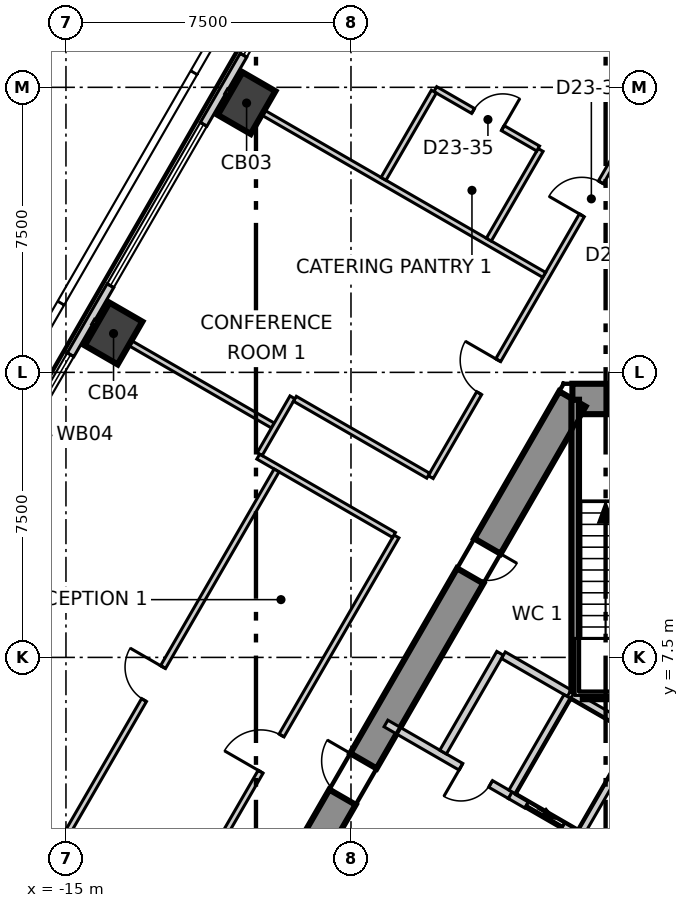
"""IFC4 building model, lengths in metres.
Left out: names, types, materials, properties, quantities, classifications, styles, units other than length and angle.
Written with IfcOpenShell. Run it as: python <this file> out.ifc"""

import sys

from ifc_helpers import new_model, si_unit, direction, frame, frame_2d, origin, origin_2d, place, context, subcontext, project, spatial, polyline, rectangle, outline, extrude, element, fill, save


model = new_model("IFC4")
c1 = context("Model", 3, precision=1e-05, world=origin(), true_north=direction((0.0, 1.0)))
c2 = subcontext(c1, "Body", "Model", "MODEL_VIEW")
j1 = project(units=[si_unit("LENGTHUNIT", "METRE"), si_unit("PLANEANGLEUNIT", "RADIAN")], contexts=[c1])
p1 = place(None, origin())
s1 = spatial("IfcSite", under=j1, at=p1, CompositionType="ELEMENT")
p2 = place(p1, origin())
s2 = spatial("IfcBuilding", under=s1, at=p2, CompositionType="ELEMENT")
p3 = place(p2, frame((0.0, 0.0, 104.3)))
s3 = spatial("IfcBuildingStorey", under=s2, at=p3, CompositionType="ELEMENT", Elevation=104.3)
p4 = place(p3, frame((1.674, 14.3, -0.3), z_axis=(0.0, 0.0, 1.0), x_axis=(-1.0, 0.0, 0.0)))
e1 = element("IfcWall", 1, at=p4, inside=s3, PredefinedType="SHEAR", context=c2, shape_type="SweptSolid", body=[
    extrude(outline(polyline([(-0.231, -0.4), (1.674, -0.4), (3.579, -0.4), (3.117, 0.4), (1.674, 0.4), (0.231, 0.4), (-0.231, -0.4)])), origin(), (0.0, 0.0, 1.0), 4.0),
])
p5 = place(p4, frame((0.974, 0.0, 0.3)))
e2 = element("IfcOpeningElement", 2, at=p5, cuts=e1, PredefinedType="OPENING", context=c2, shape_type="SweptSolid", body=[
    extrude(rectangle(XDim=1.4, YDim=2.1, at=frame_2d((0.7, 1.05))), frame((0.0, 0.41, 0.0), z_axis=(0.0, -1.0, 0.0), x_axis=(1.0, 0.0, 0.0)), (0.0, 0.0, 1.0), 0.82),
])
p6 = place(p3, frame((-1.674, 14.3, -0.3), z_axis=(0.0, 0.0, 1.0), x_axis=(-0.499995765644, -0.866027848477, 0.0)))
e3 = element("IfcWall", 3, at=p6, inside=s3, PredefinedType="SHEAR", context=c2, shape_type="SweptSolid", body=[
    extrude(outline(polyline([(-0.231, -0.4), (1.732, -0.4), (3.695, -0.4), (5.658, -0.4), (7.621, -0.4), (9.584, -0.4), (11.547, -0.4), (13.51, -0.4), (15.473, -0.4), (17.436, -0.4), (19.399, -0.4), (21.362, -0.4), (23.325, -0.4), (22.863, 0.4), (20.977, 0.4), (19.091, 0.4), (17.205, 0.4), (15.319, 0.4), (13.433, 0.4), (11.547, 0.4), (9.661, 0.4), (7.775, 0.4), (5.889, 0.4), (4.003, 0.4), (2.117, 0.4), (0.231, 0.4), (-0.231, -0.4)])), origin(), (0.0, 0.0, 1.0), 4.0),
])
p7 = place(p6, frame((10.997, 0.0, 0.3)))
e4 = element("IfcOpeningElement", 4, at=p7, cuts=e3, PredefinedType="OPENING", context=c2, shape_type="SweptSolid", body=[
    extrude(rectangle(XDim=1.1, YDim=2.1, at=frame_2d((0.55, 1.05))), frame((0.0, 0.41, 0.0), z_axis=(0.0, -1.0, 0.0), x_axis=(1.0, 0.0, 0.0)), (0.0, 0.0, 1.0), 0.82),
])
p8 = place(p6, frame((4.474, 0.0, 0.3)))
e5 = element("IfcOpeningElement", 5, at=p8, cuts=e3, PredefinedType="OPENING", context=c2, shape_type="SweptSolid", body=[
    extrude(rectangle(XDim=0.9, YDim=2.1, at=frame_2d((0.45, 1.05))), frame((0.0, 0.41, 0.0), z_axis=(0.0, -1.0, 0.0), x_axis=(1.0, 0.0, 0.0)), (0.0, 0.0, 1.0), 0.82),
])
for number, where, z_axis, x_axis in (
    (6, (-10.247, 22.086, -0.3), (0.0, 0.0, 1.0), (0.5, 0.866, 0.0)),
    (7, (-13.748, 16.022, -0.3), (0.0, 0.0, 1.0), (0.5, 0.866, 0.0)),
):
    element("IfcColumn", number, at=place(p3, frame(where, z_axis=z_axis, x_axis=x_axis)), inside=s3, PredefinedType="COLUMN", context=c2, shape_type="SweptSolid", body=[
        extrude(rectangle(XDim=1.3, YDim=1.0, at=origin_2d()), origin(), (0.0, 0.0, 1.0), 4.0),
    ])
p9 = place(p3, frame((-3.2, 35.691, 0.0), z_axis=(0.0, 0.0, 1.0), x_axis=(-0.500010127185, -0.866019556773, 0.0)))
e8 = element("IfcWall", 8, at=p9, inside=s3, PredefinedType="ELEMENTEDWALL", context=c2, shape_type="SweptSolid", body=[
    extrude(rectangle(XDim=58.599, YDim=0.2, at=frame_2d((29.299, 0.0))), origin(), (0.0, 0.0, 1.0), 3.7),
])
p10 = place(p9, frame((2.353, 0.0, 0.9)))
e9 = element("IfcOpeningElement", 9, at=p10, cuts=e8, PredefinedType="OPENING", context=c2, shape_type="SweptSolid", body=[
    extrude(rectangle(XDim=4.9, YDim=2.5, at=frame_2d((2.45, 1.25))), frame((0.0, 0.11, 0.0), z_axis=(0.0, -1.0, 0.0), x_axis=(1.0, 0.0, 0.0)), (0.0, 0.0, 1.0), 0.22),
])
p11 = place(p9, frame((9.355, 0.0, 0.9)))
e10 = element("IfcOpeningElement", 10, at=p11, cuts=e8, PredefinedType="OPENING", context=c2, shape_type="SweptSolid", body=[
    extrude(rectangle(XDim=4.9, YDim=2.5, at=frame_2d((2.45, 1.25))), frame((0.0, 0.11, 0.0), z_axis=(0.0, -1.0, 0.0), x_axis=(1.0, 0.0, 0.0)), (0.0, 0.0, 1.0), 0.22),
])
p12 = place(p9, frame((16.357, 0.0, 0.9)))
e11 = element("IfcOpeningElement", 11, at=p12, cuts=e8, PredefinedType="OPENING", context=c2, shape_type="SweptSolid", body=[
    extrude(rectangle(XDim=4.9, YDim=2.5, at=frame_2d((2.45, 1.25))), frame((0.0, 0.11, 0.0), z_axis=(0.0, -1.0, 0.0), x_axis=(1.0, 0.0, 0.0)), (0.0, 0.0, 1.0), 0.22),
])
p13 = place(p9, frame((23.358, 0.0, 0.9)))
e12 = element("IfcOpeningElement", 12, at=p13, cuts=e8, PredefinedType="OPENING", context=c2, shape_type="SweptSolid", body=[
    extrude(rectangle(XDim=4.9, YDim=2.5, at=frame_2d((2.45, 1.25))), frame((0.0, 0.11, 0.0), z_axis=(0.0, -1.0, 0.0), x_axis=(1.0, 0.0, 0.0)), (0.0, 0.0, 1.0), 0.22),
])
p14 = place(p9, frame((30.36, 0.0, 0.9)))
e13 = element("IfcOpeningElement", 13, at=p14, cuts=e8, PredefinedType="OPENING", context=c2, shape_type="SweptSolid", body=[
    extrude(rectangle(XDim=4.9, YDim=2.5, at=frame_2d((2.45, 1.25))), frame((0.0, 0.11, 0.0), z_axis=(0.0, -1.0, 0.0), x_axis=(1.0, 0.0, 0.0)), (0.0, 0.0, 1.0), 0.22),
])
p15 = place(p9, frame((37.362, 0.0, 0.9)))
e14 = element("IfcOpeningElement", 14, at=p15, cuts=e8, PredefinedType="OPENING", context=c2, shape_type="SweptSolid", body=[
    extrude(rectangle(XDim=4.9, YDim=2.5, at=frame_2d((2.45, 1.25))), frame((0.0, 0.11, 0.0), z_axis=(0.0, -1.0, 0.0), x_axis=(1.0, 0.0, 0.0)), (0.0, 0.0, 1.0), 0.22),
])
p16 = place(p9, frame((44.363, 0.0, 0.9)))
e15 = element("IfcOpeningElement", 15, at=p16, cuts=e8, PredefinedType="OPENING", context=c2, shape_type="SweptSolid", body=[
    extrude(rectangle(XDim=4.9, YDim=2.5, at=frame_2d((2.45, 1.25))), frame((0.0, 0.11, 0.0), z_axis=(0.0, -1.0, 0.0), x_axis=(1.0, 0.0, 0.0)), (0.0, 0.0, 1.0), 0.22),
])
p17 = place(p9, frame((51.365, 0.0, 0.9)))
e16 = element("IfcOpeningElement", 16, at=p17, cuts=e8, PredefinedType="OPENING", context=c2, shape_type="SweptSolid", body=[
    extrude(rectangle(XDim=4.9, YDim=2.5, at=frame_2d((2.45, 1.25))), frame((0.0, 0.11, 0.0), z_axis=(0.0, -1.0, 0.0), x_axis=(1.0, 0.0, 0.0)), (0.0, 0.0, 1.0), 0.22),
])
p18 = place(p3, frame((-21.286, 4.205, 0.0), z_axis=(0.0, 0.0, 1.0), x_axis=(0.866007579589, -0.500030871142, 0.0)))
e17 = element("IfcWall", 17, at=p18, inside=s3, PredefinedType="PARTITIONING", context=c2, shape_type="SweptSolid", body=[
    extrude(rectangle(XDim=9.662, YDim=0.15, at=frame_2d((4.831, 0.0))), origin(), (0.0, 0.0, 1.0), 3.7),
])
p19 = place(p3, frame((-18.631, -10.669, 0.0), z_axis=(0.0, 0.0, 1.0), x_axis=(0.500015596868, 0.866016398741, 0.0)))
e18 = element("IfcWall", 18, at=p19, inside=s3, PredefinedType="PARTITIONING", context=c2, shape_type="SweptSolid", body=[
    extrude(rectangle(XDim=24.656, YDim=0.15, at=frame_2d((12.328, 0.0))), origin(), (0.0, 0.0, 1.0), 3.7),
])
p20 = place(p19, frame((17.507, 0.0, 0.0)))
e19 = element("IfcOpeningElement", 19, at=p20, cuts=e18, PredefinedType="OPENING", context=c2, shape_type="SweptSolid", body=[
    extrude(rectangle(XDim=1.1, YDim=2.1, at=frame_2d((0.55, 1.05))), frame((0.0, 0.085, 0.0), z_axis=(0.0, -1.0, 0.0), x_axis=(1.0, 0.0, 0.0)), (0.0, 0.0, 1.0), 0.17),
])
p21 = place(p19, frame((5.104, 0.0, 0.0)))
e20 = element("IfcOpeningElement", 20, at=p21, cuts=e18, PredefinedType="OPENING", context=c2, shape_type="SweptSolid", body=[
    extrude(rectangle(XDim=1.1, YDim=2.1, at=frame_2d((0.55, 1.05))), frame((0.0, 0.085, 0.0), z_axis=(0.0, -1.0, 0.0), x_axis=(1.0, 0.0, 0.0)), (0.0, 0.0, 1.0), 0.17),
])
p22 = place(p3, frame((-5.402, 12.244, 0.0), z_axis=(0.0, 0.0, 1.0), x_axis=(0.500020433321, 0.86601360628, 0.0)))
e21 = element("IfcWall", 21, at=p22, inside=s3, PredefinedType="PARTITIONING", context=c2, shape_type="SweptSolid", body=[
    extrude(rectangle(XDim=10.804, YDim=0.15, at=frame_2d((5.402, 0.0))), origin(), (0.0, 0.0, 1.0), 3.7),
])
p23 = place(p22, frame((7.954, 0.0, 0.0)))
e22 = element("IfcOpeningElement", 22, at=p23, cuts=e21, PredefinedType="OPENING", context=c2, shape_type="SweptSolid", body=[
    extrude(rectangle(XDim=1.0, YDim=2.1, at=frame_2d((0.5, 1.05))), frame((0.0, 0.085, 0.0), z_axis=(0.0, -1.0, 0.0), x_axis=(1.0, 0.0, 0.0)), (0.0, 0.0, 1.0), 0.17),
])
p24 = place(p22, frame((2.551, 0.0, 0.0)))
e23 = element("IfcOpeningElement", 23, at=p24, cuts=e21, PredefinedType="OPENING", context=c2, shape_type="SweptSolid", body=[
    extrude(rectangle(XDim=1.0, YDim=2.1, at=frame_2d((0.5, 1.05))), frame((0.0, 0.085, 0.0), z_axis=(0.0, -1.0, 0.0), x_axis=(1.0, 0.0, 0.0)), (0.0, 0.0, 1.0), 0.17),
])
p25 = place(p3, frame((-14.285, 16.332, 0.0), z_axis=(0.0, 0.0, 1.0), x_axis=(0.86601735395, -0.500013942463, 0.0)))
e24 = element("IfcWall", 24, at=p25, inside=s3, PredefinedType="PARTITIONING", context=c2, shape_type="SweptSolid", body=[
    extrude(rectangle(XDim=5.462, YDim=0.15, at=frame_2d((2.731, 0.0))), origin(), (0.0, 0.0, 1.0), 3.7),
])
p26 = place(p3, frame((-9.94, 12.784, 0.0), z_axis=(0.0, 0.0, 1.0), x_axis=(0.866056461986, -0.499946201759, 0.0)))
e25 = element("IfcWall", 25, at=p26, inside=s3, PredefinedType="PARTITIONING", context=c2, shape_type="SweptSolid", body=[
    extrude(rectangle(XDim=4.125, YDim=0.15, at=frame_2d((2.062, 0.0))), origin(), (0.0, 0.0, 1.0), 3.7),
])
p27 = place(p3, frame((-9.902, 12.849, 0.0), z_axis=(0.0, 0.0, 1.0), x_axis=(0.499808228569, 0.866136094765, 0.0)))
e26 = element("IfcWall", 26, at=p27, inside=s3, PredefinedType="PARTITIONING", context=c2, shape_type="SweptSolid", body=[
    extrude(rectangle(XDim=1.725, YDim=0.15, at=frame_2d((0.862, 0.0))), origin(), (0.0, 0.0, 1.0), 3.7),
])
p28 = place(p3, frame((-10.784, 22.396, 0.0), z_axis=(0.0, 0.0, 1.0), x_axis=(0.86603284879, -0.49998710465, 0.0)))
e27 = element("IfcWall", 27, at=p28, inside=s3, PredefinedType="PARTITIONING", context=c2, shape_type="SweptSolid", body=[
    extrude(rectangle(XDim=9.662, YDim=0.15, at=frame_2d((4.831, 0.0))), origin(), (0.0, 0.0, 1.0), 3.7),
])
p29 = place(p3, frame((-8.975, 14.305, 0.0), z_axis=(0.0, 0.0, 1.0), x_axis=(0.866120332886, -0.499835541916, 0.0)))
e28 = element("IfcWall", 28, at=p29, inside=s3, PredefinedType="PARTITIONING", context=c2, shape_type="SweptSolid", body=[
    extrude(rectangle(XDim=4.049, YDim=0.15, at=frame_2d((2.024, 0.0))), origin(), (0.0, 0.0, 1.0), 3.7),
])
p30 = place(p3, frame((-3.873, 18.492, 0.0), z_axis=(0.0, 0.0, 1.0), x_axis=(0.500117899823, 0.865957323588, 0.0)))
e29 = element("IfcWall", 29, at=p30, inside=s3, PredefinedType="PARTITIONING", context=c2, shape_type="SweptSolid", body=[
    extrude(rectangle(XDim=2.725, YDim=0.15, at=frame_2d((1.363, 0.0))), origin(), (0.0, 0.0, 1.0), 3.7),
])
p31 = place(p3, frame((-15.934, 1.202, 0.0), z_axis=(0.0, 0.0, 1.0), x_axis=(0.499994937304, 0.866028326714, 0.0)))
e30 = element("IfcWall", 30, at=p31, inside=s3, PredefinedType="PARTITIONING", context=c2, shape_type="SweptSolid", body=[
    extrude(rectangle(XDim=12.952, YDim=0.15, at=frame_2d((6.476, 0.0))), origin(), (0.0, 0.0, 1.0), 3.7),
])
p32 = place(p31, frame((5.977, 0.0, 0.0)))
e31 = element("IfcOpeningElement", 31, at=p32, cuts=e30, PredefinedType="OPENING", context=c2, shape_type="SweptSolid", body=[
    extrude(rectangle(XDim=1.0, YDim=2.1, at=frame_2d((0.5, 1.05))), frame((0.0, 0.085, 0.0), z_axis=(0.0, -1.0, 0.0), x_axis=(1.0, 0.0, 0.0)), (0.0, 0.0, 1.0), 0.17),
])
p33 = place(p3, frame((-5.281, 22.452, 0.0), z_axis=(0.0, 0.0, 1.0), x_axis=(0.866071089505, -0.499920861661, 0.0)))
e32 = element("IfcWall", 32, at=p33, inside=s3, PredefinedType="PARTITIONING", context=c2, shape_type="SweptSolid", body=[
    extrude(rectangle(XDim=3.125, YDim=0.15, at=frame_2d((1.562, 0.0))), origin(), (0.0, 0.0, 1.0), 3.7),
])
p34 = place(p33, frame((1.149, 0.0, 0.0)))
e33 = element("IfcOpeningElement", 33, at=p34, cuts=e32, PredefinedType="OPENING", context=c2, shape_type="SweptSolid", body=[
    extrude(rectangle(XDim=0.9, YDim=2.1, at=frame_2d((0.45, 1.05))), frame((0.0, 0.085, 0.0), z_axis=(0.0, -1.0, 0.0), x_axis=(1.0, 0.0, 0.0)), (0.0, 0.0, 1.0), 0.17),
])
p35 = place(p3, frame((-6.644, 20.092, 0.0), z_axis=(0.0, 0.0, 1.0), x_axis=(0.499993606316, 0.866029095148, 0.0)))
e34 = element("IfcWall", 34, at=p35, inside=s3, PredefinedType="PARTITIONING", context=c2, shape_type="SweptSolid", body=[
    extrude(rectangle(XDim=2.65, YDim=0.15, at=frame_2d((1.325, 0.0))), origin(), (0.0, 0.0, 1.0), 3.7),
])
p36 = place(p3, frame((-6.58, 5.762, 0.0), z_axis=(0.0, 0.0, 1.0), x_axis=(0.866029704776, -0.49999255039, 0.0)))
e35 = element("IfcWall", 35, at=p36, inside=s3, PredefinedType="SOLIDWALL", context=c2, shape_type="SweptSolid", body=[
    extrude(rectangle(XDim=3.782, YDim=0.2, at=frame_2d((1.891, 0.0))), origin(), (0.0, 0.0, 1.0), 3.7),
])
p37 = place(p36, frame((2.279, 0.0, 0.0)))
e36 = element("IfcOpeningElement", 36, at=p37, cuts=e35, PredefinedType="OPENING", context=c2, shape_type="SweptSolid", body=[
    extrude(rectangle(XDim=0.9, YDim=2.1, at=frame_2d((0.45, 1.05))), frame((0.0, 0.11, 0.0), z_axis=(0.0, -1.0, 0.0), x_axis=(1.0, 0.0, 0.0)), (0.0, 0.0, 1.0), 0.22),
])
p38 = place(p3, frame((-5.076, 5.009, 0.0), z_axis=(0.0, 0.0, 1.0), x_axis=(0.50002537861, 0.866010750942, 0.0)))
e37 = element("IfcWall", 37, at=p38, inside=s3, PredefinedType="SOLIDWALL", context=c2, shape_type="SweptSolid", body=[
    extrude(rectangle(XDim=3.0, YDim=0.2, at=frame_2d((1.5, 0.0))), origin(), (0.0, 0.0, 1.0), 3.7),
])
p39 = place(p3, frame((-3.489, 7.557, 0.0), z_axis=(0.0, 0.0, 1.0), x_axis=(0.866010750942, -0.50002537861, 0.0)))
e38 = element("IfcWall", 38, at=p39, inside=s3, PredefinedType="SOLIDWALL", context=c2, shape_type="SweptSolid", body=[
    extrude(rectangle(XDim=2.0, YDim=0.2, at=frame_2d((1.0, 0.0))), origin(), (0.0, 0.0, 1.0), 3.7),
])
p40 = place(p3, frame((-3.309, 3.873, 0.0), z_axis=(0.0, 0.0, 1.0), x_axis=(0.866098583652, -0.499873227325, 0.0)))
e39 = element("IfcWall", 39, at=p40, inside=s3, PredefinedType="SOLIDWALL", context=c2, shape_type="SweptSolid", body=[
    extrude(rectangle(XDim=2.103, YDim=0.2, at=frame_2d((1.051, 0.0))), origin(), (0.0, 0.0, 1.0), 3.7),
])
p41 = place(p40, frame((0.502, 0.0, 0.0)))
e40 = element("IfcOpeningElement", 40, at=p41, cuts=e39, PredefinedType="OPENING", context=c2, shape_type="SweptSolid", body=[
    extrude(rectangle(XDim=1.1, YDim=2.1, at=frame_2d((0.55, 1.05))), frame((0.0, 0.11, 0.0), z_axis=(0.0, -1.0, 0.0), x_axis=(1.0, 0.0, 0.0)), (0.0, 0.0, 1.0), 0.22),
])
p42 = place(p3, frame((-3.257, 3.959, 0.0), z_axis=(0.0, 0.0, 1.0), x_axis=(0.50012328804, 0.865954211699, 0.0)))
e41 = element("IfcWall", 41, at=p42, inside=s3, PredefinedType="SOLIDWALL", context=c2, shape_type="SweptSolid", body=[
    extrude(rectangle(XDim=2.9, YDim=0.2, at=frame_2d((1.45, 0.0))), origin(), (0.0, 0.0, 1.0), 3.7),
])
p43 = place(p3, frame((-1.67, 6.507, 0.0), z_axis=(0.0, 0.0, 1.0), x_axis=(0.865941441609, -0.500145398563, 0.0)))
e42 = element("IfcWall", 42, at=p43, inside=s3, PredefinedType="SOLIDWALL", context=c2, shape_type="SweptSolid", body=[
    extrude(rectangle(XDim=1.815, YDim=0.2, at=frame_2d((0.908, 0.0))), origin(), (0.0, 0.0, 1.0), 3.7),
])
p44 = place(p3, frame((-1.438, 2.909, 0.0), z_axis=(0.0, 0.0, 1.0), x_axis=(0.499829630636, 0.866123744241, 0.0)))
e43 = element("IfcWall", 43, at=p44, inside=s3, PredefinedType="SOLIDWALL", context=c2, shape_type="SweptSolid", body=[
    extrude(rectangle(XDim=2.761, YDim=0.2, at=frame_2d((1.38, 0.0))), origin(), (0.0, 0.0, 1.0), 3.7),
])
p45 = place(p3, frame((-1.4, 6.5, 0.0), z_axis=(0.0, 0.0, 1.0), x_axis=(1.0, 0.0, 0.0)))
e44 = element("IfcWall", 44, at=p45, inside=s3, PredefinedType="SOLIDWALL", context=c2, shape_type="SweptSolid", body=[
    extrude(rectangle(XDim=2.8, YDim=0.2, at=frame_2d((1.4, 0.0))), origin(), (0.0, 0.0, 1.0), 3.7),
])
p46 = place(p3, frame((-1.6, 6.615, 0.0), z_axis=(0.0, 0.0, 1.0), x_axis=(0.0, 1.0, 0.0)))
e45 = element("IfcWall", 45, at=p46, inside=s3, PredefinedType="SOLIDWALL", context=c2, shape_type="SweptSolid", body=[
    extrude(rectangle(XDim=7.665, YDim=0.2, at=frame_2d((3.833, 0.0))), origin(), (0.0, 0.0, 1.0), 3.7),
])
p47 = place(p11, origin())
e46 = element("IfcWindow", 46, at=p47, inside=s3, PartitioningType="SINGLE_PANEL", PredefinedType="WINDOW", context=c2, shape_type="SweptSolid", body=[
    extrude(rectangle(XDim=4.9, YDim=2.5, at=frame_2d((2.45, 1.25))), frame((0.0, 0.03, 0.0), z_axis=(0.0, -1.0, 0.0), x_axis=(1.0, 0.0, 0.0)), (0.0, 0.0, 1.0), 0.06),
])
fill(e10, e46)
p48 = place(p12, origin())
e47 = element("IfcWindow", 47, at=p48, inside=s3, PartitioningType="SINGLE_PANEL", PredefinedType="WINDOW", context=c2, shape_type="SweptSolid", body=[
    extrude(rectangle(XDim=4.9, YDim=2.5, at=frame_2d((2.45, 1.25))), frame((0.0, 0.03, 0.0), z_axis=(0.0, -1.0, 0.0), x_axis=(1.0, 0.0, 0.0)), (0.0, 0.0, 1.0), 0.06),
])
fill(e11, e47)
p49 = place(p13, origin())
e48 = element("IfcWindow", 48, at=p49, inside=s3, PartitioningType="SINGLE_PANEL", PredefinedType="WINDOW", context=c2, shape_type="SweptSolid", body=[
    extrude(rectangle(XDim=4.9, YDim=2.5, at=frame_2d((2.45, 1.25))), frame((0.0, 0.03, 0.0), z_axis=(0.0, -1.0, 0.0), x_axis=(1.0, 0.0, 0.0)), (0.0, 0.0, 1.0), 0.06),
])
fill(e12, e48)
p50 = place(p41, origin())
e49 = element("IfcDoor", 49, at=p50, inside=s3, OperationType="SLIDING_TO_LEFT", PredefinedType="DOOR", context=c2, shape_type="SweptSolid", body=[
    extrude(rectangle(XDim=1.1, YDim=2.1, at=frame_2d((0.55, 1.05))), frame((0.0, 0.025, 0.0), z_axis=(0.0, -1.0, 0.0), x_axis=(1.0, 0.0, 0.0)), (0.0, 0.0, 1.0), 0.05),
])
fill(e40, e49)
p51 = place(p37, origin())
e50 = element("IfcDoor", 50, at=p51, inside=s3, OperationType="SINGLE_SWING_LEFT", PredefinedType="DOOR", context=c2, shape_type="SweptSolid", body=[
    extrude(rectangle(XDim=0.9, YDim=2.1, at=frame_2d((0.45, 1.05))), frame((0.0, 0.025, 0.0), z_axis=(0.0, -1.0, 0.0), x_axis=(1.0, 0.0, 0.0)), (0.0, 0.0, 1.0), 0.05),
])
fill(e36, e50)
p52 = place(p23, origin())
e51 = element("IfcDoor", 51, at=p52, inside=s3, OperationType="SINGLE_SWING_RIGHT", PredefinedType="DOOR", context=c2, shape_type="SweptSolid", body=[
    extrude(rectangle(XDim=1.0, YDim=2.1, at=frame_2d((0.5, 1.05))), frame((0.0, 0.025, 0.0), z_axis=(0.0, -1.0, 0.0), x_axis=(1.0, 0.0, 0.0)), (0.0, 0.0, 1.0), 0.05),
])
fill(e22, e51)
p53 = place(p34, origin())
e52 = element("IfcDoor", 52, at=p53, inside=s3, OperationType="SINGLE_SWING_LEFT", PredefinedType="DOOR", context=c2, shape_type="SweptSolid", body=[
    extrude(rectangle(XDim=0.9, YDim=2.1, at=frame_2d((0.45, 1.05))), frame((0.0, 0.025, 0.0), z_axis=(0.0, -1.0, 0.0), x_axis=(1.0, 0.0, 0.0)), (0.0, 0.0, 1.0), 0.05),
])
fill(e33, e52)
p54 = place(p24, origin())
e53 = element("IfcDoor", 53, at=p54, inside=s3, OperationType="SINGLE_SWING_LEFT", PredefinedType="DOOR", context=c2, shape_type="SweptSolid", body=[
    extrude(rectangle(XDim=1.0, YDim=2.1, at=frame_2d((0.5, 1.05))), frame((0.0, 0.025, 0.0), z_axis=(0.0, -1.0, 0.0), x_axis=(1.0, 0.0, 0.0)), (0.0, 0.0, 1.0), 0.05),
])
fill(e23, e53)
p55 = place(p20, origin())
e54 = element("IfcDoor", 54, at=p55, inside=s3, OperationType="SINGLE_SWING_RIGHT", PredefinedType="DOOR", context=c2, shape_type="SweptSolid", body=[
    extrude(rectangle(XDim=1.1, YDim=2.1, at=frame_2d((0.55, 1.05))), frame((0.0, 0.025, 0.0), z_axis=(0.0, -1.0, 0.0), x_axis=(1.0, 0.0, 0.0)), (0.0, 0.0, 1.0), 0.05),
])
fill(e19, e54)
p56 = place(p32, origin())
e55 = element("IfcDoor", 55, at=p56, inside=s3, OperationType="SINGLE_SWING_LEFT", PredefinedType="DOOR", context=c2, shape_type="SweptSolid", body=[
    extrude(rectangle(XDim=1.0, YDim=2.1, at=frame_2d((0.5, 1.05))), frame((0.0, 0.025, 0.0), z_axis=(0.0, -1.0, 0.0), x_axis=(1.0, 0.0, 0.0)), (0.0, 0.0, 1.0), 0.05),
])
fill(e31, e55)
p57 = place(p7, origin())
e56 = element("IfcDoor", 56, at=p57, inside=s3, OperationType="SINGLE_SWING_LEFT", PredefinedType="DOOR", context=c2, shape_type="SweptSolid", body=[
    extrude(rectangle(XDim=1.1, YDim=2.1, at=frame_2d((0.55, 1.05))), frame((0.0, 0.025, 0.0), z_axis=(0.0, -1.0, 0.0), x_axis=(1.0, 0.0, 0.0)), (0.0, 0.0, 1.0), 0.05),
])
fill(e4, e56)
p58 = place(p8, origin())
e57 = element("IfcDoor", 57, at=p58, inside=s3, OperationType="SINGLE_SWING_RIGHT", PredefinedType="DOOR", context=c2, shape_type="SweptSolid", body=[
    extrude(rectangle(XDim=0.9, YDim=2.1, at=frame_2d((0.45, 1.05))), frame((0.0, 0.025, 0.0), z_axis=(0.0, -1.0, 0.0), x_axis=(1.0, 0.0, 0.0)), (0.0, 0.0, 1.0), 0.05),
])
fill(e5, e57)
save(model, sys.argv[1])
